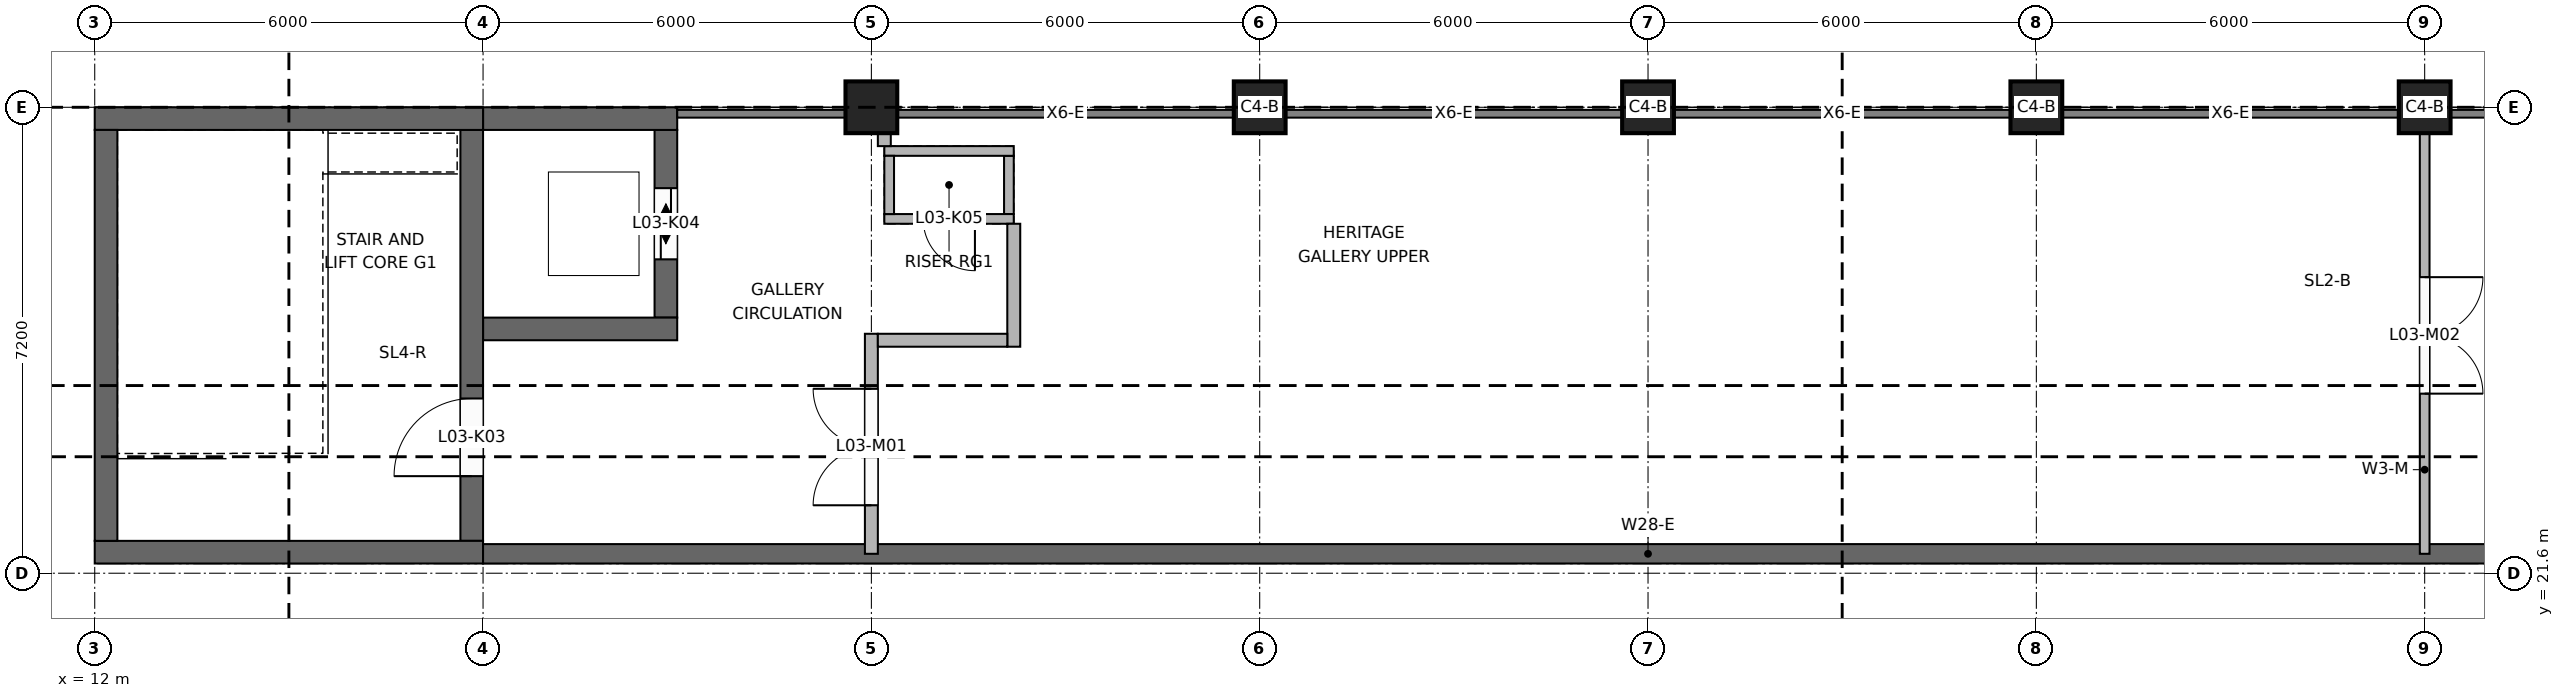
"""IFC4 building model, lengths in metres.
Left out: names, types, materials, properties, quantities, classifications, styles, units other than length and angle.
Written with IfcOpenShell. Run it as: python <this file> out.ifc"""

import sys

from ifc_helpers import new_model, si_unit, direction, frame, frame_2d, origin, origin_2d, place, context, subcontext, project, spatial, rectangle, extrude, element, fill, save


model = new_model("IFC4")
c1 = context("Model", 3, precision=1e-05, world=origin(), true_north=direction((0.0, 1.0)))
c2 = subcontext(c1, "Body", "Model", "MODEL_VIEW")
j1 = project(units=[si_unit("LENGTHUNIT", "METRE"), si_unit("PLANEANGLEUNIT", "RADIAN")], contexts=[c1])
p1 = place(None, origin())
s1 = spatial("IfcSite", under=j1, at=p1, CompositionType="ELEMENT")
p2 = place(p1, origin())
s2 = spatial("IfcBuilding", under=s1, at=p2, CompositionType="ELEMENT")
p3 = place(p2, frame((0.0, 0.0, 12.6)))
s3 = spatial("IfcBuildingStorey", under=s2, at=p3, CompositionType="ELEMENT", Elevation=12.6)
for number, where, z_axis, x_axis in (
    (1, (12.0, 21.925, 0.0), (0.0, 0.0, 1.0), (1.0, 0.0, 0.0)),
    (2, (12.0, 28.625, 0.0), (0.0, 0.0, 1.0), (1.0, 0.0, 0.0)),
):
    element("IfcWall", number, at=place(p3, frame(where, z_axis=z_axis, x_axis=x_axis)), inside=s3, PredefinedType="SHEAR", context=c2, shape_type="SweptSolid", body=[
        extrude(rectangle(XDim=6.0, YDim=0.35, at=frame_2d((3.0, 0.0))), origin(), (0.0, 0.0, 1.0), 3.95),
    ])
p4 = place(p3, frame((12.175, 22.1, 0.0), z_axis=(0.0, 0.0, 1.0), x_axis=(0.0, 1.0, 0.0)))
e3 = element("IfcWall", 3, at=p4, inside=s3, PredefinedType="SHEAR", context=c2, shape_type="SweptSolid", body=[
    extrude(rectangle(XDim=6.35, YDim=0.35, at=frame_2d((3.175, 0.0))), origin(), (0.0, 0.0, 1.0), 3.95),
])
p5 = place(p3, frame((17.825, 22.1, 0.0), z_axis=(0.0, 0.0, 1.0), x_axis=(0.0, 1.0, 0.0)))
e4 = element("IfcWall", 4, at=p5, inside=s3, PredefinedType="SHEAR", context=c2, shape_type="SweptSolid", body=[
    extrude(rectangle(XDim=6.35, YDim=0.35, at=frame_2d((3.175, 0.0))), origin(), (0.0, 0.0, 1.0), 3.95),
])
p6 = place(p5, frame((1.0, 0.0, 0.0)))
e5 = element("IfcOpeningElement", 5, at=p6, cuts=e4, PredefinedType="OPENING", context=c2, shape_type="SweptSolid", body=[
    extrude(rectangle(XDim=1.2, YDim=2.1, at=frame_2d((0.6, 1.05))), frame((0.0, 0.185, 0.0), z_axis=(0.0, -1.0, 0.0), x_axis=(1.0, 0.0, 0.0)), (0.0, 0.0, 1.0), 0.37),
])
for number, where, z_axis, x_axis in (
    (6, (18.0, 25.375, 0.0), (0.0, 0.0, 1.0), (1.0, 0.0, 0.0)),
    (7, (18.0, 28.625, 0.0), (0.0, 0.0, 1.0), (1.0, 0.0, 0.0)),
):
    element("IfcWall", number, at=place(p3, frame(where, z_axis=z_axis, x_axis=x_axis)), inside=s3, PredefinedType="SHEAR", context=c2, shape_type="SweptSolid", body=[
        extrude(rectangle(XDim=3.0, YDim=0.35, at=frame_2d((1.5, 0.0))), origin(), (0.0, 0.0, 1.0), 5.75),
    ])
p7 = place(p3, frame((20.825, 25.55, 0.0), z_axis=(0.0, 0.0, 1.0), x_axis=(0.0, 1.0, 0.0)))
e8 = element("IfcWall", 8, at=p7, inside=s3, PredefinedType="SHEAR", context=c2, shape_type="SweptSolid", body=[
    extrude(rectangle(XDim=2.9, YDim=0.35, at=frame_2d((1.45, 0.0))), origin(), (0.0, 0.0, 1.0), 5.75),
])
p8 = place(p7, frame((0.9, 0.0, 0.0)))
e9 = element("IfcOpeningElement", 9, at=p8, cuts=e8, PredefinedType="OPENING", context=c2, shape_type="SweptSolid", body=[
    extrude(rectangle(XDim=1.1, YDim=2.1, at=frame_2d((0.55, 1.05))), frame((0.0, 0.185, 0.0), z_axis=(0.0, -1.0, 0.0), x_axis=(1.0, 0.0, 0.0)), (0.0, 0.0, 1.0), 0.37),
])
p9 = place(p3, frame((24.2, 27.075, 0.0), z_axis=(0.0, 0.0, 1.0), x_axis=(1.0, 0.0, 0.0)))
e10 = element("IfcWall", 10, at=p9, inside=s3, PredefinedType="SOLIDWALL", context=c2, shape_type="SweptSolid", body=[
    extrude(rectangle(XDim=2.0, YDim=0.15, at=frame_2d((1.0, 0.0))), origin(), (0.0, 0.0, 1.0), 3.95),
])
p10 = place(p9, frame((0.6, 0.0, 0.0)))
e11 = element("IfcOpeningElement", 11, at=p10, cuts=e10, PredefinedType="OPENING", context=c2, shape_type="SweptSolid", body=[
    extrude(rectangle(XDim=0.8, YDim=2.1, at=frame_2d((0.4, 1.05))), frame((0.0, 0.085, 0.0), z_axis=(0.0, -1.0, 0.0), x_axis=(1.0, 0.0, 0.0)), (0.0, 0.0, 1.0), 0.17),
])
p11 = place(p3, frame((24.2, 28.125, 0.0), z_axis=(0.0, 0.0, 1.0), x_axis=(1.0, 0.0, 0.0)))
e12 = element("IfcWall", 12, at=p11, inside=s3, PredefinedType="SOLIDWALL", context=c2, shape_type="SweptSolid", body=[
    extrude(rectangle(XDim=2.0, YDim=0.15, at=frame_2d((1.0, 0.0))), origin(), (0.0, 0.0, 1.0), 3.95),
])
for number, where, z_axis, x_axis in (
    (13, (24.275, 27.15, 0.0), (0.0, 0.0, 1.0), (0.0, 1.0, 0.0)),
    (14, (26.125, 27.15, 0.0), (0.0, 0.0, 1.0), (0.0, 1.0, 0.0)),
):
    element("IfcWall", number, at=place(p3, frame(where, z_axis=z_axis, x_axis=x_axis)), inside=s3, PredefinedType="SOLIDWALL", context=c2, shape_type="SweptSolid", body=[
        extrude(rectangle(XDim=0.9, YDim=0.15, at=frame_2d((0.45, 0.0))), origin(), (0.0, 0.0, 1.0), 3.95),
    ])
for number, where, z_axis, x_axis in (
    (15, (24.0, 28.8, 0.0), (0.0, 0.0, 1.0), (1.0, 0.0, 0.0)),
    (16, (30.0, 28.8, 0.0), (0.0, 0.0, 1.0), (1.0, 0.0, 0.0)),
    (17, (36.0, 28.8, 0.0), (0.0, 0.0, 1.0), (1.0, 0.0, 0.0)),
    (18, (42.0, 28.8, 0.0), (0.0, 0.0, 1.0), (1.0, 0.0, 0.0)),
    (19, (48.0, 28.8, 0.0), (0.0, 0.0, 1.0), (1.0, 0.0, 0.0)),
):
    element("IfcColumn", number, at=place(p3, frame(where, z_axis=z_axis, x_axis=x_axis)), inside=s3, PredefinedType="COLUMN", context=c2, shape_type="SweptSolid", body=[
        extrude(rectangle(XDim=0.8, YDim=0.8, at=origin_2d()), origin(), (0.0, 0.0, 1.0), 3.95),
    ])
p12 = place(p3, frame((18.0, 21.9, 0.0), z_axis=(0.0, 0.0, 1.0), x_axis=(1.0, 0.0, 0.0)))
e20 = element("IfcWall", 20, at=p12, inside=s3, PredefinedType="SOLIDWALL", context=c2, shape_type="SweptSolid", body=[
    extrude(rectangle(XDim=36.0, YDim=0.3, at=frame_2d((18.0, 0.0))), origin(), (0.0, 0.0, 1.0), 3.95),
])
p13 = place(p3, frame((17.91, 7.22, 0.0), z_axis=(0.0, 0.0, 1.0), x_axis=(0.0, 1.0, 0.0)))
e21 = element("IfcWall", 21, at=p13, inside=s3, PredefinedType="PARAPET", context=c2, shape_type="SweptSolid", body=[
    extrude(rectangle(XDim=14.38, YDim=0.18, at=frame_2d((7.19, 0.0))), origin(), (0.0, 0.0, 1.0), 1.1),
])
p14 = place(p3, frame((0.0, 21.51, 0.0), z_axis=(0.0, 0.0, 1.0), x_axis=(1.0, 0.0, 0.0)))
e22 = element("IfcWall", 22, at=p14, inside=s3, PredefinedType="PARAPET", context=c2, shape_type="SweptSolid", body=[
    extrude(rectangle(XDim=18.0, YDim=0.18, at=frame_2d((9.0, 0.0))), origin(), (0.0, 0.0, 1.0), 1.1),
])
p15 = place(p3, frame((24.0, 21.9, 0.0), z_axis=(0.0, 0.0, 1.0), x_axis=(0.0, 1.0, 0.0)))
e23 = element("IfcWall", 23, at=p15, inside=s3, PredefinedType="PARTITIONING", context=c2, shape_type="SweptSolid", body=[
    extrude(rectangle(XDim=3.4, YDim=0.2, at=frame_2d((1.7, 0.0))), origin(), (0.0, 0.0, 1.0), 3.15),
])
p16 = place(p15, frame((0.75, 0.0, 0.0)))
e24 = element("IfcOpeningElement", 24, at=p16, cuts=e23, PredefinedType="OPENING", context=c2, shape_type="SweptSolid", body=[
    extrude(rectangle(XDim=1.8, YDim=2.4, at=frame_2d((0.9, 1.2))), frame((0.0, 0.11, 0.0), z_axis=(0.0, -1.0, 0.0), x_axis=(1.0, 0.0, 0.0)), (0.0, 0.0, 1.0), 0.22),
])
p17 = place(p3, frame((24.2, 28.2, 0.0), z_axis=(0.0, 0.0, 1.0), x_axis=(0.0, 1.0, 0.0)))
e25 = element("IfcWall", 25, at=p17, inside=s3, PredefinedType="PARTITIONING", context=c2, shape_type="SweptSolid", body=[
    extrude(rectangle(XDim=0.2, YDim=0.2, at=frame_2d((0.1, 0.0))), origin(), (0.0, 0.0, 1.0), 3.15),
])
p18 = place(p3, frame((26.2, 25.1, 0.0), z_axis=(0.0, 0.0, 1.0), x_axis=(0.0, 1.0, 0.0)))
e26 = element("IfcWall", 26, at=p18, inside=s3, PredefinedType="PARTITIONING", context=c2, shape_type="SweptSolid", body=[
    extrude(rectangle(XDim=1.9, YDim=0.2, at=frame_2d((0.95, 0.0))), origin(), (0.0, 0.0, 1.0), 3.95),
])
p19 = place(p3, frame((48.0, 21.9, 0.0), z_axis=(0.0, 0.0, 1.0), x_axis=(0.0, 1.0, 0.0)))
e27 = element("IfcWall", 27, at=p19, inside=s3, PredefinedType="PARTITIONING", context=c2, shape_type="SweptSolid", body=[
    extrude(rectangle(XDim=6.5, YDim=0.15, at=frame_2d((3.25, 0.0))), origin(), (0.0, 0.0, 1.0), 3.15),
])
p20 = place(p19, frame((2.475, 0.0, 0.0)))
e28 = element("IfcOpeningElement", 28, at=p20, cuts=e27, PredefinedType="OPENING", context=c2, shape_type="SweptSolid", body=[
    extrude(rectangle(XDim=1.8, YDim=2.4, at=frame_2d((0.9, 1.2))), frame((0.0, 0.085, 0.0), z_axis=(0.0, -1.0, 0.0), x_axis=(1.0, 0.0, 0.0)), (0.0, 0.0, 1.0), 0.17),
])
p21 = place(p3, frame((24.1, 25.2, 0.0), z_axis=(0.0, 0.0, 1.0), x_axis=(1.0, 0.0, 0.0)))
e29 = element("IfcWall", 29, at=p21, inside=s3, PredefinedType="PARTITIONING", context=c2, shape_type="SweptSolid", body=[
    extrude(rectangle(XDim=2.0, YDim=0.2, at=frame_2d((1.0, 0.0))), origin(), (0.0, 0.0, 1.0), 3.15),
])
p22 = place(p6, origin())
e30 = element("IfcDoor", 30, at=p22, inside=s3, OperationType="SINGLE_SWING_LEFT", PredefinedType="DOOR", context=c2, shape_type="SweptSolid", body=[
    extrude(rectangle(XDim=1.2, YDim=2.1, at=frame_2d((0.6, 1.05))), frame((0.0, 0.025, 0.0), z_axis=(0.0, -1.0, 0.0), x_axis=(1.0, 0.0, 0.0)), (0.0, 0.0, 1.0), 0.05),
])
fill(e5, e30)
p23 = place(p8, origin())
e31 = element("IfcDoor", 31, at=p23, inside=s3, OperationType="DOUBLE_DOOR_SLIDING", PredefinedType="DOOR", context=c2, shape_type="SweptSolid", body=[
    extrude(rectangle(XDim=1.1, YDim=2.1, at=frame_2d((0.55, 1.05))), frame((0.0, 0.025, 0.0), z_axis=(0.0, -1.0, 0.0), x_axis=(1.0, 0.0, 0.0)), (0.0, 0.0, 1.0), 0.05),
])
fill(e9, e31)
p24 = place(p10, frame((0.8, 0.0, 0.0), z_axis=(0.0, 0.0, 1.0), x_axis=(-1.0, 0.0, 0.0)))
e32 = element("IfcDoor", 32, at=p24, inside=s3, OperationType="SINGLE_SWING_LEFT", PredefinedType="DOOR", context=c2, shape_type="SweptSolid", body=[
    extrude(rectangle(XDim=0.8, YDim=2.1, at=frame_2d((0.4, 1.05))), frame((0.0, 0.025, 0.0), z_axis=(0.0, -1.0, 0.0), x_axis=(1.0, 0.0, 0.0)), (0.0, 0.0, 1.0), 0.05),
])
fill(e11, e32)
p25 = place(p16, origin())
e33 = element("IfcDoor", 33, at=p25, inside=s3, OperationType="DOUBLE_DOOR_SINGLE_SWING", PredefinedType="DOOR", context=c2, shape_type="SweptSolid", body=[
    extrude(rectangle(XDim=1.8, YDim=2.4, at=frame_2d((0.9, 1.2))), frame((0.0, 0.025, 0.0), z_axis=(0.0, -1.0, 0.0), x_axis=(1.0, 0.0, 0.0)), (0.0, 0.0, 1.0), 0.05),
])
fill(e24, e33)
p26 = place(p20, frame((1.8, 0.0, 0.0), z_axis=(0.0, 0.0, 1.0), x_axis=(-1.0, 0.0, 0.0)))
e34 = element("IfcDoor", 34, at=p26, inside=s3, OperationType="DOUBLE_DOOR_SINGLE_SWING", PredefinedType="DOOR", context=c2, shape_type="SweptSolid", body=[
    extrude(rectangle(XDim=1.8, YDim=2.4, at=frame_2d((0.9, 1.2))), frame((0.0, 0.025, 0.0), z_axis=(0.0, -1.0, 0.0), x_axis=(1.0, 0.0, 0.0)), (0.0, 0.0, 1.0), 0.05),
])
fill(e28, e34)
save(model, sys.argv[1])
